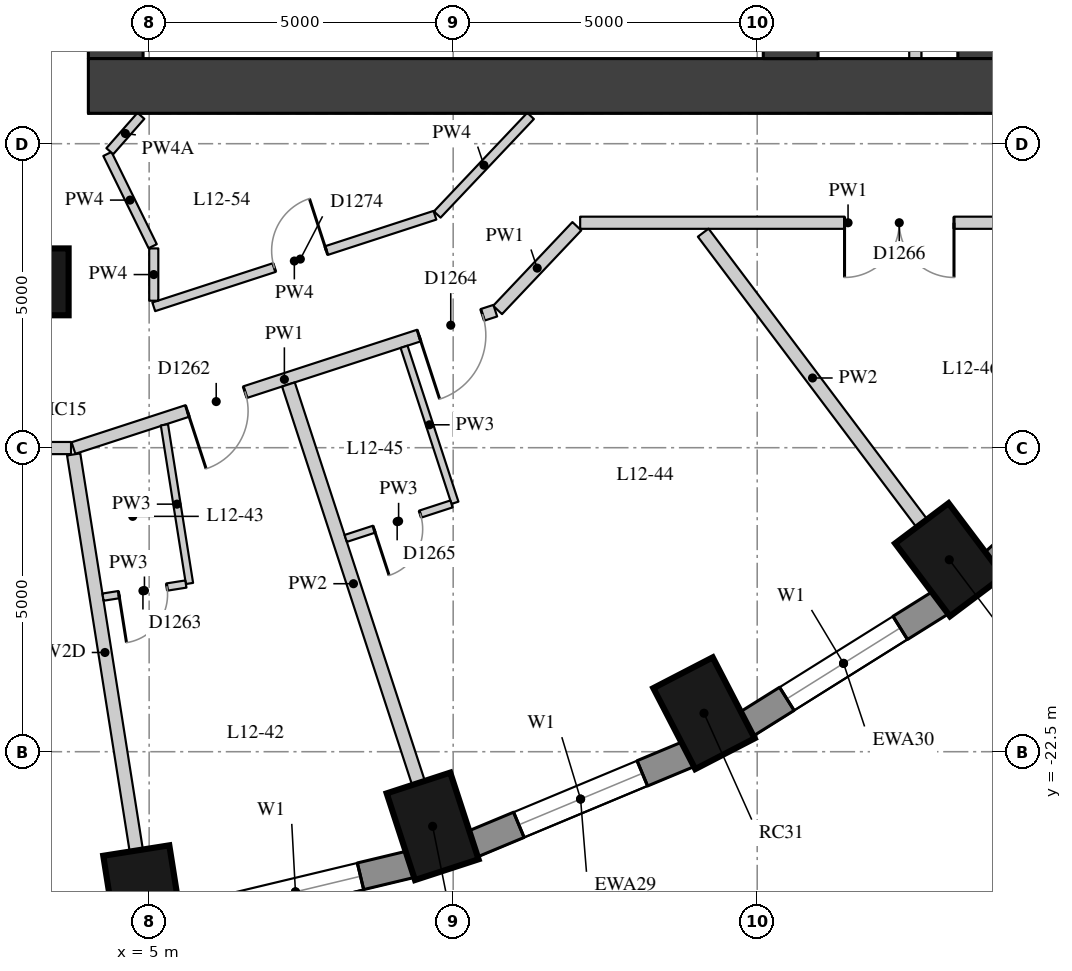
"""IFC4 building model, lengths in metres.
Left out: names, types, materials, properties, quantities, classifications, styles, units other than length and angle.
Written with IfcOpenShell. Run it as: python <this file> out.ifc"""

import sys

from ifc_helpers import new_model, si_unit, direction, frame, frame_2d, origin, origin_2d, place, context, subcontext, project, spatial, rectangle, extrude, element, fill, save


model = new_model("IFC4")
c1 = context("Model", 3, precision=1e-05, world=origin(), true_north=direction((0.0, 1.0)))
c2 = subcontext(c1, "Body", "Model", "MODEL_VIEW")
j1 = project(units=[si_unit("LENGTHUNIT", "METRE"), si_unit("PLANEANGLEUNIT", "RADIAN")], contexts=[c1])
p1 = place(None, origin())
s1 = spatial("IfcSite", under=j1, at=p1, CompositionType="ELEMENT")
p2 = place(p1, origin())
s2 = spatial("IfcBuilding", under=s1, at=p2, CompositionType="ELEMENT")
p3 = place(p2, frame((0.0, 0.0, 48.1)))
s3 = spatial("IfcBuildingStorey", under=s2, at=p3, CompositionType="ELEMENT", Elevation=48.1)
for number, where, z_axis, x_axis in (
    (1, (4.906, -24.866, 0.0), (0.0, 0.0, 1.0), (0.156, -0.988, 0.0)),
    (2, (9.662, -23.727, 0.0), (0.0, 0.0, 1.0), (0.31, -0.951, 0.0)),
    (3, (14.125, -21.867, 0.0), (0.0, 0.0, 1.0), (0.46, -0.888, 0.0)),
    (4, (18.159, -19.343, 0.0), (0.0, 0.0, 1.0), (0.601, -0.799, 0.0)),
):
    element("IfcColumn", number, at=place(p3, frame(where, z_axis=z_axis, x_axis=x_axis)), inside=s3, PredefinedType="COLUMN", context=c2, shape_type="SweptSolid", body=[
        extrude(rectangle(XDim=1.5, YDim=1.1, at=origin_2d()), origin(), (0.0, 0.0, 1.0), 3.3),
    ])
p4 = place(p3, frame((3.126, -14.772, 0.0), z_axis=(0.0, 0.0, 1.0), x_axis=(1.0, 0.0, 0.0)))
e5 = element("IfcColumn", 5, at=p4, inside=s3, PredefinedType="COLUMN", context=c2, shape_type="SweptSolid", body=[
    extrude(rectangle(XDim=1.1, YDim=1.1, at=origin_2d()), origin(), (0.0, 0.0, 1.0), 3.3),
])
p5 = place(p3, frame((5.504, -25.26, 0.0), z_axis=(0.0, 0.0, 1.0), x_axis=(0.972496561493, 0.232917233979, 0.0)))
e6 = element("IfcWall", 6, at=p5, inside=s3, PredefinedType="SOLIDWALL", context=c2, shape_type="SweptSolid", body=[
    extrude(rectangle(XDim=3.911, YDim=0.45, at=frame_2d((1.956, 0.0))), origin(), (0.0, 0.0, 1.0), 3.02),
])
p6 = place(p5, frame((0.855, 0.0, 0.4)))
e7 = element("IfcOpeningElement", 7, at=p6, cuts=e6, PredefinedType="OPENING", context=c2, shape_type="SweptSolid", body=[
    extrude(rectangle(XDim=2.2, YDim=1.75, at=frame_2d((1.1, 0.875))), frame((0.0, 0.235, 0.0), z_axis=(0.0, -1.0, 0.0), x_axis=(1.0, 0.0, 0.0)), (0.0, 0.0, 1.0), 0.47),
])
p7 = place(p3, frame((10.315, -24.021, 0.0), z_axis=(0.0, 0.0, 1.0), x_axis=(0.923031964282, 0.384723267966, 0.0)))
e8 = element("IfcWall", 8, at=p7, inside=s3, PredefinedType="SOLIDWALL", context=c2, shape_type="SweptSolid", body=[
    extrude(rectangle(XDim=3.856, YDim=0.45, at=frame_2d((1.928, 0.0))), origin(), (0.0, 0.0, 1.0), 3.02),
])
p8 = place(p7, frame((0.828, 0.0, 0.4)))
e9 = element("IfcOpeningElement", 9, at=p8, cuts=e8, PredefinedType="OPENING", context=c2, shape_type="SweptSolid", body=[
    extrude(rectangle(XDim=2.2, YDim=1.75, at=frame_2d((1.1, 0.875))), frame((0.0, 0.235, 0.0), z_axis=(0.0, -1.0, 0.0), x_axis=(1.0, 0.0, 0.0)), (0.0, 0.0, 1.0), 0.47),
])
p9 = place(p3, frame((14.817, -22.051, 0.0), z_axis=(0.0, 0.0, 1.0), x_axis=(0.847635480093, 0.530579016629, 0.0)))
e10 = element("IfcWall", 10, at=p9, inside=s3, PredefinedType="SOLIDWALL", context=c2, shape_type="SweptSolid", body=[
    extrude(rectangle(XDim=3.782, YDim=0.45, at=frame_2d((1.891, 0.0))), origin(), (0.0, 0.0, 1.0), 3.02),
])
p10 = place(p9, frame((0.791, 0.0, 0.4)))
e11 = element("IfcOpeningElement", 11, at=p10, cuts=e10, PredefinedType="OPENING", context=c2, shape_type="SweptSolid", body=[
    extrude(rectangle(XDim=2.2, YDim=1.75, at=frame_2d((1.1, 0.875))), frame((0.0, 0.235, 0.0), z_axis=(0.0, -1.0, 0.0), x_axis=(1.0, 0.0, 0.0)), (0.0, 0.0, 1.0), 0.47),
])
p11 = place(p3, frame((18.871, -19.407, 0.0), z_axis=(0.0, 0.0, 1.0), x_axis=(0.745526233716, 0.66647628228, 0.0)))
e12 = element("IfcWall", 12, at=p11, inside=s3, PredefinedType="SOLIDWALL", context=c2, shape_type="SweptSolid", body=[
    extrude(rectangle(XDim=3.697, YDim=0.45, at=frame_2d((1.848, 0.0))), origin(), (0.0, 0.0, 1.0), 3.02),
])
p12 = place(p3, frame((4.45, -11.1, 0.0), z_axis=(0.0, 0.0, 1.0), x_axis=(0.0, 1.0, 0.0)))
e13 = element("IfcWall", 13, at=p12, inside=s3, PredefinedType="SHEAR", context=c2, shape_type="SweptSolid", body=[
    extrude(rectangle(XDim=22.2, YDim=0.9, at=frame_2d((11.1, 0.0))), origin(), (0.0, 0.0, 1.0), 3.02),
])
p13 = place(p12, frame((2.35, 0.0, 0.0)))
e14 = element("IfcOpeningElement", 14, at=p13, cuts=e13, PredefinedType="OPENING", context=c2, shape_type="SweptSolid", body=[
    extrude(rectangle(XDim=1.5, YDim=2.1, at=frame_2d((0.75, 1.05))), frame((0.0, 0.46, 0.0), z_axis=(0.0, -1.0, 0.0), x_axis=(1.0, 0.0, 0.0)), (0.0, 0.0, 1.0), 0.92),
])
p14 = place(p12, frame((5.45, 0.0, 0.0)))
e15 = element("IfcOpeningElement", 15, at=p14, cuts=e13, PredefinedType="OPENING", context=c2, shape_type="SweptSolid", body=[
    extrude(rectangle(XDim=1.8, YDim=2.1, at=frame_2d((0.9, 1.05))), frame((0.0, 0.46, 0.0), z_axis=(0.0, -1.0, 0.0), x_axis=(1.0, 0.0, 0.0)), (0.0, 0.0, 1.0), 0.92),
])
p15 = place(p12, frame((7.95, 0.0, 0.0)))
e16 = element("IfcOpeningElement", 16, at=p15, cuts=e13, PredefinedType="OPENING", context=c2, shape_type="SweptSolid", body=[
    extrude(rectangle(XDim=1.1, YDim=2.1, at=frame_2d((0.55, 1.05))), frame((0.0, 0.46, 0.0), z_axis=(0.0, -1.0, 0.0), x_axis=(1.0, 0.0, 0.0)), (0.0, 0.0, 1.0), 0.92),
])
p16 = place(p12, frame((10.6, 0.0, 0.0)))
e17 = element("IfcOpeningElement", 17, at=p16, cuts=e13, PredefinedType="OPENING", context=c2, shape_type="SweptSolid", body=[
    extrude(rectangle(XDim=1.0, YDim=2.1, at=frame_2d((0.5, 1.05))), frame((0.0, 0.46, 0.0), z_axis=(0.0, -1.0, 0.0), x_axis=(1.0, 0.0, 0.0)), (0.0, 0.0, 1.0), 0.92),
])
p17 = place(p12, frame((13.15, 0.0, 0.0)))
e18 = element("IfcOpeningElement", 18, at=p17, cuts=e13, PredefinedType="OPENING", context=c2, shape_type="SweptSolid", body=[
    extrude(rectangle(XDim=1.1, YDim=2.1, at=frame_2d((0.55, 1.05))), frame((0.0, 0.46, 0.0), z_axis=(0.0, -1.0, 0.0), x_axis=(1.0, 0.0, 0.0)), (0.0, 0.0, 1.0), 0.92),
])
p18 = place(p12, frame((14.95, 0.0, 0.0)))
e19 = element("IfcOpeningElement", 19, at=p18, cuts=e13, PredefinedType="OPENING", context=c2, shape_type="SweptSolid", body=[
    extrude(rectangle(XDim=1.8, YDim=2.1, at=frame_2d((0.9, 1.05))), frame((0.0, 0.46, 0.0), z_axis=(0.0, -1.0, 0.0), x_axis=(1.0, 0.0, 0.0)), (0.0, 0.0, 1.0), 0.92),
])
p19 = place(p12, frame((18.35, 0.0, 0.0)))
e20 = element("IfcOpeningElement", 20, at=p19, cuts=e13, PredefinedType="OPENING", context=c2, shape_type="SweptSolid", body=[
    extrude(rectangle(XDim=1.5, YDim=2.1, at=frame_2d((0.75, 1.05))), frame((0.0, 0.46, 0.0), z_axis=(0.0, -1.0, 0.0), x_axis=(1.0, 0.0, 0.0)), (0.0, 0.0, 1.0), 0.92),
])
p20 = place(p3, frame((18.75, -11.1, 0.0), z_axis=(0.0, 0.0, 1.0), x_axis=(0.0, 1.0, 0.0)))
e21 = element("IfcWall", 21, at=p20, inside=s3, PredefinedType="SHEAR", context=c2, shape_type="SweptSolid", body=[
    extrude(rectangle(XDim=22.2, YDim=0.9, at=frame_2d((11.1, 0.0))), origin(), (0.0, 0.0, 1.0), 3.02),
])
p21 = place(p20, frame((15.925, 0.0, 0.0)))
e22 = element("IfcOpeningElement", 22, at=p21, cuts=e21, PredefinedType="OPENING", context=c2, shape_type="SweptSolid", body=[
    extrude(rectangle(XDim=1.5, YDim=2.1, at=frame_2d((0.75, 1.05))), frame((0.0, 0.46, 0.0), z_axis=(0.0, -1.0, 0.0), x_axis=(1.0, 0.0, 0.0)), (0.0, 0.0, 1.0), 0.92),
])
p22 = place(p20, frame((4.525, 0.0, 0.0)))
e23 = element("IfcOpeningElement", 23, at=p22, cuts=e21, PredefinedType="OPENING", context=c2, shape_type="SweptSolid", body=[
    extrude(rectangle(XDim=1.5, YDim=2.1, at=frame_2d((0.75, 1.05))), frame((0.0, 0.46, 0.0), z_axis=(0.0, -1.0, 0.0), x_axis=(1.0, 0.0, 0.0)), (0.0, 0.0, 1.0), 0.92),
])
p23 = place(p3, frame((4.0, -11.55, 0.0), z_axis=(0.0, 0.0, 1.0), x_axis=(1.0, 0.0, 0.0)))
e24 = element("IfcWall", 24, at=p23, inside=s3, PredefinedType="SHEAR", context=c2, shape_type="SweptSolid", body=[
    extrude(rectangle(XDim=15.2, YDim=0.9, at=frame_2d((7.6, 0.0))), origin(), (0.0, 0.0, 1.0), 3.02),
])
p24 = place(p3, frame((15.55, -11.1, 0.0), z_axis=(0.0, 0.0, 1.0), x_axis=(0.0, 1.0, 0.0)))
e25 = element("IfcWall", 25, at=p24, inside=s3, PredefinedType="SHEAR", context=c2, shape_type="SweptSolid", body=[
    extrude(rectangle(XDim=22.2, YDim=0.9, at=frame_2d((11.1, 0.0))), origin(), (0.0, 0.0, 1.0), 3.02),
])
p25 = place(p24, frame((15.6, 0.0, 0.0)))
e26 = element("IfcOpeningElement", 26, at=p25, cuts=e25, PredefinedType="OPENING", context=c2, shape_type="SweptSolid", body=[
    extrude(rectangle(XDim=1.0, YDim=2.1, at=frame_2d((0.5, 1.05))), frame((0.0, 0.46, 0.0), z_axis=(0.0, -1.0, 0.0), x_axis=(1.0, 0.0, 0.0)), (0.0, 0.0, 1.0), 0.92),
])
p26 = place(p24, frame((5.6, 0.0, 0.0)))
e27 = element("IfcOpeningElement", 27, at=p26, cuts=e25, PredefinedType="OPENING", context=c2, shape_type="SweptSolid", body=[
    extrude(rectangle(XDim=1.0, YDim=2.1, at=frame_2d((0.5, 1.05))), frame((0.0, 0.46, 0.0), z_axis=(0.0, -1.0, 0.0), x_axis=(1.0, 0.0, 0.0)), (0.0, 0.0, 1.0), 0.92),
])
p27 = place(p3, frame((17.6, -11.1, 0.0), z_axis=(0.0, 0.0, 1.0), x_axis=(0.0, 1.0, 0.0)))
e28 = element("IfcWall", 28, at=p27, inside=s3, PredefinedType="PARTITIONING", context=c2, shape_type="SweptSolid", body=[
    extrude(rectangle(XDim=3.7, YDim=0.2, at=frame_2d((1.85, 0.0))), origin(), (0.0, 0.0, 1.0), 3.02),
])
p28 = place(p3, frame((20.9, -13.8, 0.0), z_axis=(0.0, 0.0, 1.0), x_axis=(-1.0, 0.0, 0.0)))
e29 = element("IfcWall", 29, at=p28, inside=s3, PredefinedType="PARTITIONING", context=c2, shape_type="SweptSolid", body=[
    extrude(rectangle(XDim=8.812, YDim=0.2, at=frame_2d((4.406, 0.0))), origin(), (0.0, 0.0, 1.0), 3.02),
])
p29 = place(p28, frame((2.664, 0.0, 0.0)))
e30 = element("IfcOpeningElement", 30, at=p29, cuts=e29, PredefinedType="OPENING", context=c2, shape_type="SweptSolid", body=[
    extrude(rectangle(XDim=1.8, YDim=2.1, at=frame_2d((0.9, 1.05))), frame((0.0, 0.11, 0.0), z_axis=(0.0, -1.0, 0.0), x_axis=(1.0, 0.0, 0.0)), (0.0, 0.0, 1.0), 0.22),
])
p30 = place(p3, frame((12.034, -13.858, 0.0), z_axis=(0.0, 0.0, 1.0), x_axis=(-0.687458821662, -0.726223359938, 0.0)))
e31 = element("IfcWall", 31, at=p30, inside=s3, PredefinedType="PARTITIONING", context=c2, shape_type="SweptSolid", body=[
    extrude(rectangle(XDim=1.896, YDim=0.2, at=frame_2d((0.948, 0.0))), origin(), (0.0, 0.0, 1.0), 3.02),
])
p31 = place(p3, frame((10.692, -15.247, 0.0), z_axis=(0.0, 0.0, 1.0), x_axis=(-0.950852414815, -0.309644449718, 0.0)))
e32 = element("IfcWall", 32, at=p31, inside=s3, PredefinedType="PARTITIONING", context=c2, shape_type="SweptSolid", body=[
    extrude(rectangle(XDim=7.296, YDim=0.2, at=frame_2d((3.648, 0.0))), origin(), (0.0, 0.0, 1.0), 3.02),
])
p32 = place(p31, frame((4.327, 0.0, 0.0)))
e33 = element("IfcOpeningElement", 33, at=p32, cuts=e32, PredefinedType="OPENING", context=c2, shape_type="SweptSolid", body=[
    extrude(rectangle(XDim=1.0, YDim=2.1, at=frame_2d((0.5, 1.05))), frame((0.0, 0.11, 0.0), z_axis=(0.0, -1.0, 0.0), x_axis=(1.0, 0.0, 0.0)), (0.0, 0.0, 1.0), 0.22),
])
p33 = place(p31, frame((0.22, 0.0, 0.0)))
e34 = element("IfcOpeningElement", 34, at=p33, cuts=e32, PredefinedType="OPENING", context=c2, shape_type="SweptSolid", body=[
    extrude(rectangle(XDim=1.1, YDim=2.1, at=frame_2d((0.55, 1.05))), frame((0.0, 0.11, 0.0), z_axis=(0.0, -1.0, 0.0), x_axis=(1.0, 0.0, 0.0)), (0.0, 0.0, 1.0), 0.22),
])
p34 = place(p3, frame((3.715, -17.506, 0.0), z_axis=(0.0, 0.0, 1.0), x_axis=(-1.0, 0.0, 0.0)))
e35 = element("IfcWall", 35, at=p34, inside=s3, PredefinedType="PARTITIONING", context=c2, shape_type="SweptSolid", body=[
    extrude(rectangle(XDim=7.471, YDim=0.2, at=frame_2d((3.735, 0.0))), origin(), (0.0, 0.0, 1.0), 3.02),
])
p35 = place(p34, frame((4.538, 0.0, 0.0)))
e36 = element("IfcOpeningElement", 36, at=p35, cuts=e35, PredefinedType="OPENING", context=c2, shape_type="SweptSolid", body=[
    extrude(rectangle(XDim=1.0, YDim=2.1, at=frame_2d((0.5, 1.05))), frame((0.0, 0.11, 0.0), z_axis=(0.0, -1.0, 0.0), x_axis=(1.0, 0.0, 0.0)), (0.0, 0.0, 1.0), 0.22),
])
p36 = place(p34, frame((0.743, 0.0, 0.0)))
e37 = element("IfcOpeningElement", 37, at=p36, cuts=e35, PredefinedType="OPENING", context=c2, shape_type="SweptSolid", body=[
    extrude(rectangle(XDim=1.0, YDim=2.1, at=frame_2d((0.5, 1.05))), frame((0.0, 0.11, 0.0), z_axis=(0.0, -1.0, 0.0), x_axis=(1.0, 0.0, 0.0)), (0.0, 0.0, 1.0), 0.22),
])
p37 = place(p3, frame((11.273, -12.043, 0.0), z_axis=(0.0, 0.0, 1.0), x_axis=(-0.687435283659, -0.7262456408, 0.0)))
e38 = element("IfcWall", 38, at=p37, inside=s3, PredefinedType="PARTITIONING", context=c2, shape_type="SweptSolid", body=[
    extrude(rectangle(XDim=2.233, YDim=0.15, at=frame_2d((1.117, 0.0))), origin(), (0.0, 0.0, 1.0), 3.02),
])
p38 = place(p3, frame((9.7, -13.677, 0.0), z_axis=(0.0, 0.0, 1.0), x_axis=(-0.950854246358, -0.309638825381, 0.0)))
e39 = element("IfcWall", 39, at=p38, inside=s3, PredefinedType="PARTITIONING", context=c2, shape_type="SweptSolid", body=[
    extrude(rectangle(XDim=4.863, YDim=0.15, at=frame_2d((2.432, 0.0))), origin(), (0.0, 0.0, 1.0), 3.02),
])
p39 = place(p38, frame((1.878, 0.0, 0.0)))
e40 = element("IfcOpeningElement", 40, at=p39, cuts=e39, PredefinedType="OPENING", context=c2, shape_type="SweptSolid", body=[
    extrude(rectangle(XDim=0.9, YDim=2.1, at=frame_2d((0.45, 1.05))), frame((0.0, 0.085, 0.0), z_axis=(0.0, -1.0, 0.0), x_axis=(1.0, 0.0, 0.0)), (0.0, 0.0, 1.0), 0.17),
])
p40 = place(p3, frame((5.076, -15.083, 0.0), z_axis=(0.0, 0.0, 1.0), x_axis=(0.0, 1.0, 0.0)))
e41 = element("IfcWall", 41, at=p40, inside=s3, PredefinedType="PARTITIONING", context=c2, shape_type="SweptSolid", body=[
    extrude(rectangle(XDim=0.86, YDim=0.15, at=frame_2d((0.43, 0.0))), origin(), (0.0, 0.0, 1.0), 3.02),
])
p41 = place(p3, frame((5.058, -14.186, 0.0), z_axis=(0.0, 0.0, 1.0), x_axis=(-0.440556792244, 0.897724742228, 0.0)))
e42 = element("IfcWall", 42, at=p41, inside=s3, PredefinedType="PARTITIONING", context=c2, shape_type="SweptSolid", body=[
    extrude(rectangle(XDim=1.69, YDim=0.15, at=frame_2d((0.845, 0.0))), origin(), (0.0, 0.0, 1.0), 3.02),
])
p42 = place(p3, frame((4.353, -12.623, 0.0), z_axis=(0.0, 0.0, 1.0), x_axis=(0.660265480509, 0.751032286422, 0.0)))
e43 = element("IfcWall", 43, at=p42, inside=s3, PredefinedType="PARTITIONING", context=c2, shape_type="SweptSolid", body=[
    extrude(rectangle(XDim=0.775, YDim=0.15, at=frame_2d((0.387, 0.0))), origin(), (0.0, 0.0, 1.0), 2.57),
])
p43 = place(p3, frame((4.788, -24.125, 0.0), z_axis=(0.0, 0.0, 1.0), x_axis=(-0.156122228938, 0.987737743347, 0.0)))
e44 = element("IfcWall", 44, at=p43, inside=s3, PredefinedType="PARTITIONING", context=c2, shape_type="SweptSolid", body=[
    extrude(rectangle(XDim=6.596, YDim=0.22, at=frame_2d((3.298, 0.0))), origin(), (0.0, 0.0, 1.0), 2.47),
])
p44 = place(p3, frame((9.429, -23.014, 0.0), z_axis=(0.0, 0.0, 1.0), x_axis=(-0.310230029144, 0.950661521793, 0.0)))
e45 = element("IfcWall", 45, at=p44, inside=s3, PredefinedType="PARTITIONING", context=c2, shape_type="SweptSolid", body=[
    extrude(rectangle(XDim=6.895, YDim=0.22, at=frame_2d((3.447, 0.0))), origin(), (0.0, 0.0, 1.0), 3.02),
])
p45 = place(p3, frame((17.708, -18.743, 0.0), z_axis=(0.0, 0.0, 1.0), x_axis=(-0.601181461694, 0.799112539081, 0.0)))
e46 = element("IfcWall", 46, at=p45, inside=s3, PredefinedType="PARTITIONING", context=c2, shape_type="SweptSolid", body=[
    extrude(rectangle(XDim=5.981, YDim=0.22, at=frame_2d((2.99, 0.0))), origin(), (0.0, 0.0, 1.0), 3.02),
])
p46 = place(p3, frame((5.251, -17.124, 0.0), z_axis=(0.0, 0.0, 1.0), x_axis=(0.156104955519, -0.987740473435, 0.0)))
e47 = element("IfcWall", 47, at=p46, inside=s3, PredefinedType="PARTITIONING", context=c2, shape_type="SweptSolid", body=[
    extrude(rectangle(XDim=2.642, YDim=0.12, at=frame_2d((1.321, 0.0))), origin(), (0.0, 0.0, 1.0), 3.02),
])
p47 = place(p3, frame((9.192, -15.84, 0.0), z_axis=(0.0, 0.0, 1.0), x_axis=(0.310278328391, -0.950645758909, 0.0)))
e48 = element("IfcWall", 48, at=p47, inside=s3, PredefinedType="PARTITIONING", context=c2, shape_type="SweptSolid", body=[
    extrude(rectangle(XDim=2.699, YDim=0.12, at=frame_2d((1.35, 0.0))), origin(), (0.0, 0.0, 1.0), 3.02),
])
p48 = place(p3, frame((5.604, -19.742, 0.0), z_axis=(0.0, 0.0, 1.0), x_axis=(-0.987722767831, -0.156216945011, 0.0)))
e49 = element("IfcWall", 49, at=p48, inside=s3, PredefinedType="PARTITIONING", context=c2, shape_type="SweptSolid", body=[
    extrude(rectangle(XDim=1.38, YDim=0.12, at=frame_2d((0.69, 0.0))), origin(), (0.0, 0.0, 1.0), 3.02),
])
p49 = place(p48, frame((0.315, 0.0, 0.0)))
e50 = element("IfcOpeningElement", 50, at=p49, cuts=e49, PredefinedType="OPENING", context=c2, shape_type="SweptSolid", body=[
    extrude(rectangle(XDim=0.8, YDim=2.1, at=frame_2d((0.4, 1.05))), frame((0.0, 0.07, 0.0), z_axis=(0.0, -1.0, 0.0), x_axis=(1.0, 0.0, 0.0)), (0.0, 0.0, 1.0), 0.14),
])
p50 = place(p3, frame((9.972, -18.425, 0.0), z_axis=(0.0, 0.0, 1.0), x_axis=(-0.950678536911, -0.31017788357, 0.0)))
e51 = element("IfcWall", 51, at=p50, inside=s3, PredefinedType="PARTITIONING", context=c2, shape_type="SweptSolid", body=[
    extrude(rectangle(XDim=1.83, YDim=0.12, at=frame_2d((0.915, 0.0))), origin(), (0.0, 0.0, 1.0), 3.02),
])
p51 = place(p50, frame((0.54, 0.0, 0.0)))
e52 = element("IfcOpeningElement", 52, at=p51, cuts=e51, PredefinedType="OPENING", context=c2, shape_type="SweptSolid", body=[
    extrude(rectangle(XDim=0.8, YDim=2.1, at=frame_2d((0.4, 1.05))), frame((0.0, 0.07, 0.0), z_axis=(0.0, -1.0, 0.0), x_axis=(1.0, 0.0, 0.0)), (0.0, 0.0, 1.0), 0.14),
])
p52 = place(p6, origin())
e53 = element("IfcWindow", 53, at=p52, inside=s3, PartitioningType="SINGLE_PANEL", PredefinedType="WINDOW", context=c2, shape_type="SweptSolid", body=[
    extrude(rectangle(XDim=2.2, YDim=1.75, at=frame_2d((1.1, 0.875))), frame((0.0, 0.035, 0.0), z_axis=(0.0, -1.0, 0.0), x_axis=(1.0, 0.0, 0.0)), (0.0, 0.0, 1.0), 0.06),
])
fill(e7, e53)
p53 = place(p8, origin())
e54 = element("IfcWindow", 54, at=p53, inside=s3, PartitioningType="SINGLE_PANEL", PredefinedType="WINDOW", context=c2, shape_type="SweptSolid", body=[
    extrude(rectangle(XDim=2.2, YDim=1.75, at=frame_2d((1.1, 0.875))), frame((0.0, 0.035, 0.0), z_axis=(0.0, -1.0, 0.0), x_axis=(1.0, 0.0, 0.0)), (0.0, 0.0, 1.0), 0.06),
])
fill(e9, e54)
p54 = place(p10, origin())
e55 = element("IfcWindow", 55, at=p54, inside=s3, PartitioningType="SINGLE_PANEL", PredefinedType="WINDOW", context=c2, shape_type="SweptSolid", body=[
    extrude(rectangle(XDim=2.2, YDim=1.75, at=frame_2d((1.1, 0.875))), frame((0.0, 0.035, 0.0), z_axis=(0.0, -1.0, 0.0), x_axis=(1.0, 0.0, 0.0)), (0.0, 0.0, 1.0), 0.06),
])
fill(e11, e55)
p55 = place(p32, origin())
e56 = element("IfcDoor", 56, at=p55, inside=s3, OperationType="SINGLE_SWING_RIGHT", PredefinedType="DOOR", context=c2, shape_type="SweptSolid", body=[
    extrude(rectangle(XDim=1.0, YDim=2.1, at=frame_2d((0.5, 1.05))), frame((0.0, 0.025, 0.0), z_axis=(0.0, -1.0, 0.0), x_axis=(1.0, 0.0, 0.0)), (0.0, 0.0, 1.0), 0.05),
])
fill(e33, e56)
p56 = place(p49, origin())
e57 = element("IfcDoor", 57, at=p56, inside=s3, OperationType="SINGLE_SWING_RIGHT", PredefinedType="DOOR", context=c2, shape_type="SweptSolid", body=[
    extrude(rectangle(XDim=0.8, YDim=2.1, at=frame_2d((0.4, 1.05))), frame((0.0, 0.025, 0.0), z_axis=(0.0, -1.0, 0.0), x_axis=(1.0, 0.0, 0.0)), (0.0, 0.0, 1.0), 0.05),
])
fill(e50, e57)
p57 = place(p33, origin())
e58 = element("IfcDoor", 58, at=p57, inside=s3, OperationType="SINGLE_SWING_RIGHT", PredefinedType="DOOR", context=c2, shape_type="SweptSolid", body=[
    extrude(rectangle(XDim=1.1, YDim=2.1, at=frame_2d((0.55, 1.05))), frame((0.0, 0.025, 0.0), z_axis=(0.0, -1.0, 0.0), x_axis=(1.0, 0.0, 0.0)), (0.0, 0.0, 1.0), 0.05),
])
fill(e34, e58)
p58 = place(p51, origin())
e59 = element("IfcDoor", 59, at=p58, inside=s3, OperationType="SINGLE_SWING_RIGHT", PredefinedType="DOOR", context=c2, shape_type="SweptSolid", body=[
    extrude(rectangle(XDim=0.8, YDim=2.1, at=frame_2d((0.4, 1.05))), frame((0.0, 0.025, 0.0), z_axis=(0.0, -1.0, 0.0), x_axis=(1.0, 0.0, 0.0)), (0.0, 0.0, 1.0), 0.05),
])
fill(e52, e59)
p59 = place(p29, origin())
e60 = element("IfcDoor", 60, at=p59, inside=s3, OperationType="DOUBLE_DOOR_SINGLE_SWING", PredefinedType="DOOR", context=c2, shape_type="SweptSolid", body=[
    extrude(rectangle(XDim=1.8, YDim=2.1, at=frame_2d((0.9, 1.05))), frame((0.0, 0.025, 0.0), z_axis=(0.0, -1.0, 0.0), x_axis=(1.0, 0.0, 0.0)), (0.0, 0.0, 1.0), 0.05),
])
fill(e30, e60)
p60 = place(p39, origin())
e61 = element("IfcDoor", 61, at=p60, inside=s3, OperationType="SINGLE_SWING_RIGHT", PredefinedType="DOOR", context=c2, shape_type="SweptSolid", body=[
    extrude(rectangle(XDim=0.9, YDim=2.1, at=frame_2d((0.45, 1.05))), frame((0.0, 0.025, 0.0), z_axis=(0.0, -1.0, 0.0), x_axis=(1.0, 0.0, 0.0)), (0.0, 0.0, 1.0), 0.05),
])
fill(e40, e61)
save(model, sys.argv[1])
